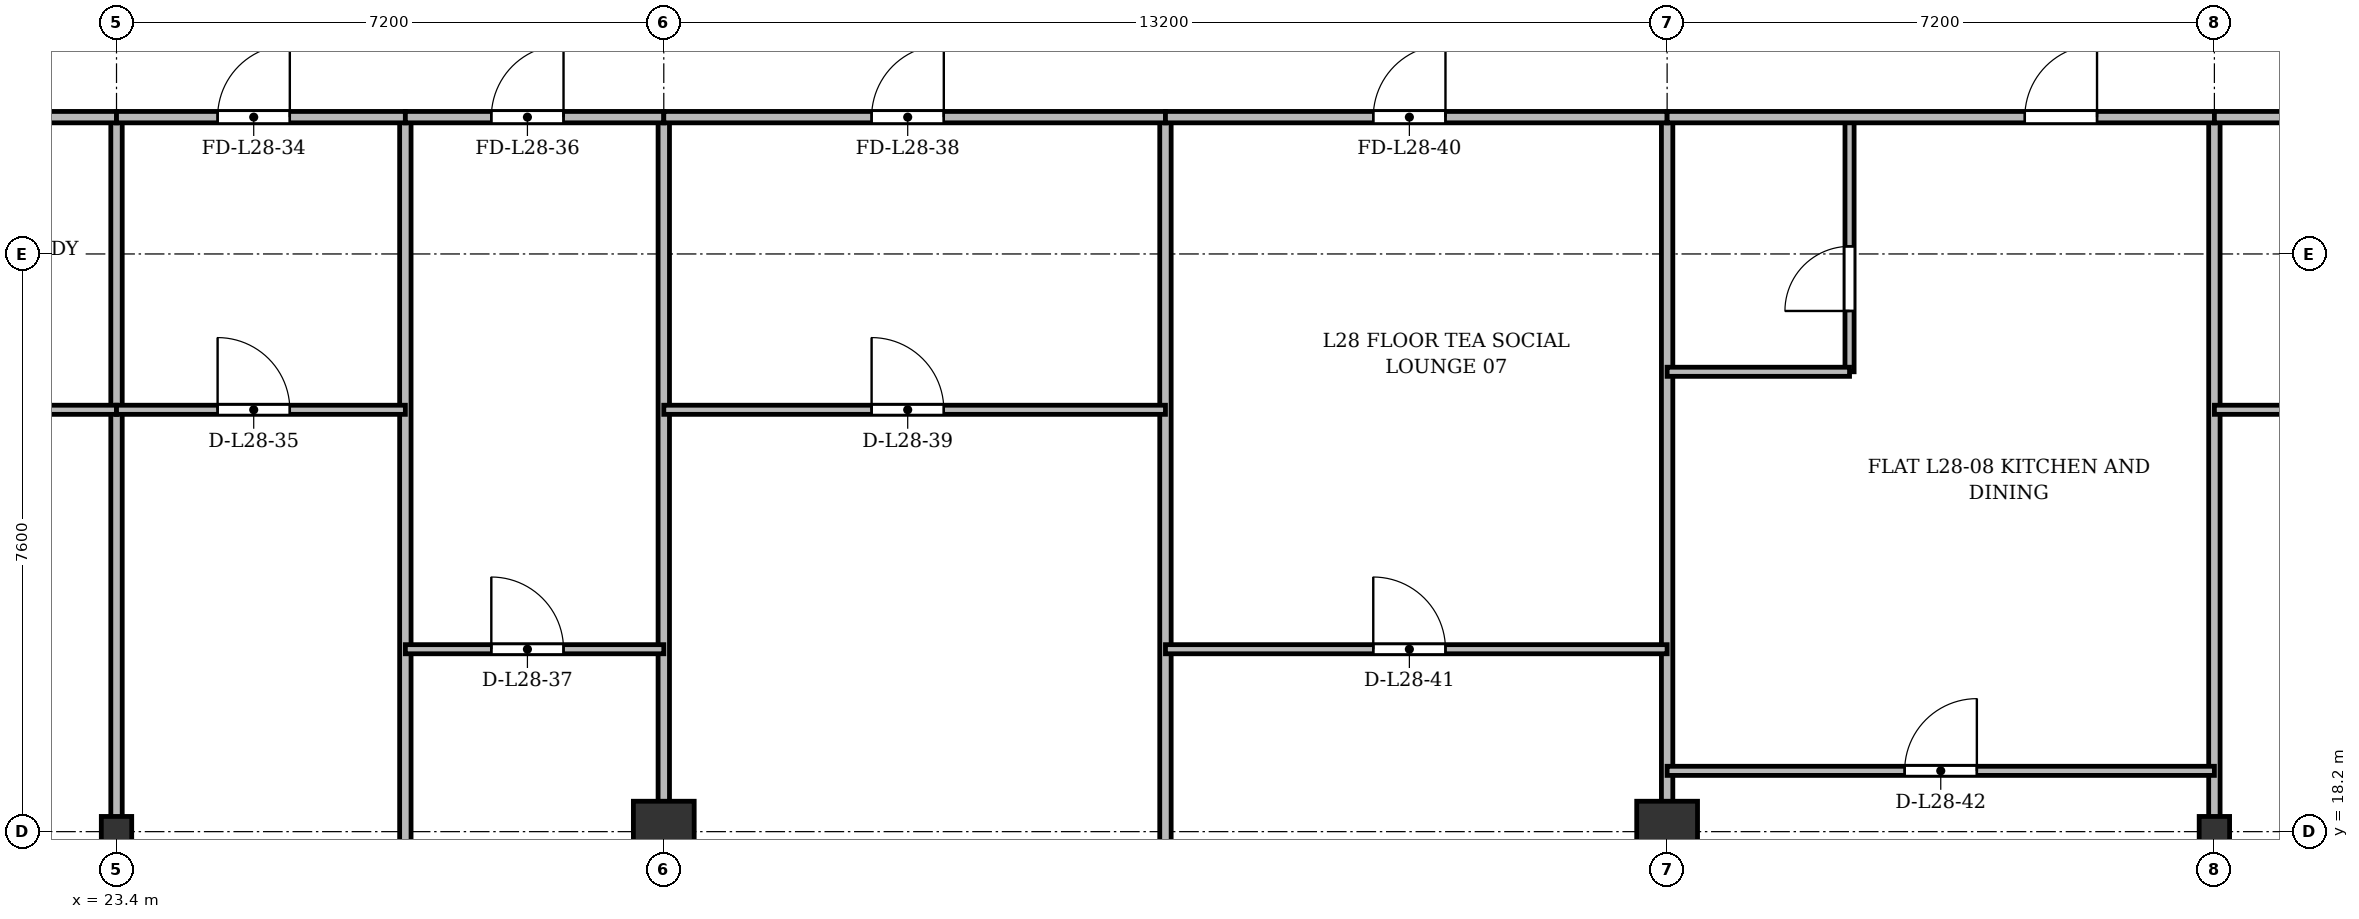
"""IFC4 building model, lengths in metres.
Left out: names, types, materials, properties, quantities, classifications, styles, units other than length and angle.
Written with IfcOpenShell. Run it as: python <this file> out.ifc"""

import sys

from ifc_helpers import new_model, si_unit, direction, frame, frame_2d, origin, origin_2d, place, context, subcontext, project, spatial, rectangle, i_section, extrude, source, transform, mapped, element, fill, save


model = new_model("IFC4")
c1 = context("Model", 3, precision=1e-05, world=origin(), true_north=direction((0.0, 1.0)))
c2 = subcontext(c1, "Body", "Model", "MODEL_VIEW")
j1 = project(units=[si_unit("LENGTHUNIT", "METRE"), si_unit("PLANEANGLEUNIT", "RADIAN")], contexts=[c1])
p1 = place(None, origin())
s1 = spatial("IfcSite", under=j1, at=p1, CompositionType="ELEMENT")
p2 = place(p1, origin())
s2 = spatial("IfcBuilding", under=s1, at=p2, CompositionType="ELEMENT")
p3 = place(p2, frame((0.0, 0.0, 110.5)))
s3 = spatial("IfcBuildingStorey", under=s2, at=p3, CompositionType="ELEMENT", Elevation=110.5)
m1 = source(origin(), c2, "Body", "SweptSolid", [
    extrude(i_section(OverallWidth=0.4, OverallDepth=0.4, WebThickness=0.022, FlangeThickness=0.035, at=origin_2d()), origin(), (0.0, 0.0, 1.0), 3.6),
])
p4 = place(p3, frame((23.4, 18.2, 0.0), z_axis=(0.0, 0.0, 1.0), x_axis=(1.0, 0.0, 0.0)))
e1 = element("IfcColumn", 1, at=p4, inside=s3, PredefinedType="COLUMN", context=c2, shape_type="MappedRepresentation", body=[
    mapped(m1, transform((0.0, 0.0, 0.0), x_axis=(1.0, 0.0, 0.0), y_axis=(0.0, 1.0, 0.0), z_axis=(0.0, 0.0, 1.0), scale=1.0)),
])
m2 = source(origin(), c2, "Body", "SweptSolid", [
    extrude(rectangle(XDim=0.8, YDim=0.8, at=origin_2d()), origin(), (0.0, 0.0, 1.0), 3.6),
])
for number, where, z_axis, x_axis in (
    (2, (30.6, 18.2, 0.0), (0.0, 0.0, 1.0), (1.0, 0.0, 0.0)),
    (3, (43.8, 18.2, 0.0), (0.0, 0.0, 1.0), (1.0, 0.0, 0.0)),
):
    element("IfcColumn", number, at=place(p3, frame(where, z_axis=z_axis, x_axis=x_axis)), inside=s3, PredefinedType="COLUMN", context=c2, shape_type="MappedRepresentation", body=[
        mapped(m2, transform((0.0, 0.0, 0.0), x_axis=(1.0, 0.0, 0.0), y_axis=(0.0, 1.0, 0.0), z_axis=(0.0, 0.0, 1.0), scale=1.0)),
    ])
p5 = place(p3, frame((51.0, 18.2, 0.0), z_axis=(0.0, 0.0, 1.0), x_axis=(1.0, 0.0, 0.0)))
e4 = element("IfcColumn", 4, at=p5, inside=s3, PredefinedType="COLUMN", context=c2, shape_type="MappedRepresentation", body=[
    mapped(m1, transform((0.0, 0.0, 0.0), x_axis=(1.0, 0.0, 0.0), y_axis=(0.0, 1.0, 0.0), z_axis=(0.0, 0.0, 1.0), scale=1.0)),
])
p6 = place(p3, frame((23.4, 3.145, 0.0), z_axis=(0.0, 0.0, 1.0), x_axis=(0.0, 1.0, 0.0)))
e5 = element("IfcWall", 5, at=p6, inside=s3, PredefinedType="PARTITIONING", context=c2, shape_type="SweptSolid", body=[
    extrude(rectangle(XDim=24.455, YDim=0.15, at=frame_2d((12.228, 0.0))), origin(), (0.0, 0.0, 1.0), 2.84),
])
p7 = place(p3, frame((27.2, 3.145, 0.0), z_axis=(0.0, 0.0, 1.0), x_axis=(0.0, 1.0, 0.0)))
e6 = element("IfcWall", 6, at=p7, inside=s3, PredefinedType="PARTITIONING", context=c2, shape_type="SweptSolid", body=[
    extrude(rectangle(XDim=24.455, YDim=0.15, at=frame_2d((12.228, 0.0))), origin(), (0.0, 0.0, 1.0), 2.752),
])
p8 = place(p3, frame((30.6, 3.145, 0.0), z_axis=(0.0, 0.0, 1.0), x_axis=(0.0, 1.0, 0.0)))
e7 = element("IfcWall", 7, at=p8, inside=s3, PredefinedType="PARTITIONING", context=c2, shape_type="SweptSolid", body=[
    extrude(rectangle(XDim=24.455, YDim=0.15, at=frame_2d((12.228, 0.0))), origin(), (0.0, 0.0, 1.0), 2.84),
])
p9 = place(p3, frame((37.2, 3.145, 0.0), z_axis=(0.0, 0.0, 1.0), x_axis=(0.0, 1.0, 0.0)))
e8 = element("IfcWall", 8, at=p9, inside=s3, PredefinedType="PARTITIONING", context=c2, shape_type="SweptSolid", body=[
    extrude(rectangle(XDim=24.455, YDim=0.15, at=frame_2d((12.228, 0.0))), origin(), (0.0, 0.0, 1.0), 2.752),
])
for number, where, z_axis, x_axis in (
    (9, (43.8, 3.145, 0.0), (0.0, 0.0, 1.0), (0.0, 1.0, 0.0)),
    (10, (51.0, 3.145, 0.0), (0.0, 0.0, 1.0), (0.0, 1.0, 0.0)),
):
    element("IfcWall", number, at=place(p3, frame(where, z_axis=z_axis, x_axis=x_axis)), inside=s3, PredefinedType="PARTITIONING", context=c2, shape_type="SweptSolid", body=[
        extrude(rectangle(XDim=24.455, YDim=0.15, at=frame_2d((12.228, 0.0))), origin(), (0.0, 0.0, 1.0), 2.84),
    ])
p10 = place(p3, frame((15.6, 27.6, 0.0), z_axis=(0.0, 0.0, 1.0), x_axis=(1.0, 0.0, 0.0)))
e11 = element("IfcWall", 11, at=p10, inside=s3, PredefinedType="PARTITIONING", context=c2, shape_type="SweptSolid", body=[
    extrude(rectangle(XDim=7.8, YDim=0.15, at=frame_2d((3.9, 0.0))), origin(), (0.0, 0.0, 1.0), 2.84),
])
p11 = place(p10, frame((3.333, 0.0, 0.0)))
e12 = element("IfcOpeningElement", 12, at=p11, cuts=e11, PredefinedType="OPENING", context=c2, shape_type="SweptSolid", body=[
    extrude(rectangle(XDim=0.95, YDim=2.15, at=frame_2d((0.475, 1.075))), frame((0.0, 0.085, 0.0), z_axis=(0.0, -1.0, 0.0), x_axis=(1.0, 0.0, 0.0)), (0.0, 0.0, 1.0), 0.17),
])
p12 = place(p3, frame((15.6, 23.75, 0.0), z_axis=(0.0, 0.0, 1.0), x_axis=(1.0, 0.0, 0.0)))
e13 = element("IfcWall", 13, at=p12, inside=s3, PredefinedType="PARTITIONING", context=c2, shape_type="SweptSolid", body=[
    extrude(rectangle(XDim=7.8, YDim=0.12, at=frame_2d((3.9, 0.0))), origin(), (0.0, 0.0, 1.0), 2.84),
])
p13 = place(p12, frame((3.333, 0.0, 0.0)))
e14 = element("IfcOpeningElement", 14, at=p13, cuts=e13, PredefinedType="OPENING", context=c2, shape_type="SweptSolid", body=[
    extrude(rectangle(XDim=0.95, YDim=2.15, at=frame_2d((0.475, 1.075))), frame((0.0, 0.07, 0.0), z_axis=(0.0, -1.0, 0.0), x_axis=(1.0, 0.0, 0.0)), (0.0, 0.0, 1.0), 0.14),
])
p14 = place(p3, frame((23.4, 27.6, 0.0), z_axis=(0.0, 0.0, 1.0), x_axis=(1.0, 0.0, 0.0)))
e15 = element("IfcWall", 15, at=p14, inside=s3, PredefinedType="PARTITIONING", context=c2, shape_type="SweptSolid", body=[
    extrude(rectangle(XDim=3.8, YDim=0.15, at=frame_2d((1.9, 0.0))), origin(), (0.0, 0.0, 1.0), 2.84),
])
p15 = place(p14, frame((1.33, 0.0, 0.0)))
e16 = element("IfcOpeningElement", 16, at=p15, cuts=e15, PredefinedType="OPENING", context=c2, shape_type="SweptSolid", body=[
    extrude(rectangle(XDim=0.95, YDim=2.15, at=frame_2d((0.475, 1.075))), frame((0.0, 0.085, 0.0), z_axis=(0.0, -1.0, 0.0), x_axis=(1.0, 0.0, 0.0)), (0.0, 0.0, 1.0), 0.17),
])
p16 = place(p3, frame((23.4, 23.75, 0.0), z_axis=(0.0, 0.0, 1.0), x_axis=(1.0, 0.0, 0.0)))
e17 = element("IfcWall", 17, at=p16, inside=s3, PredefinedType="PARTITIONING", context=c2, shape_type="SweptSolid", body=[
    extrude(rectangle(XDim=3.8, YDim=0.12, at=frame_2d((1.9, 0.0))), origin(), (0.0, 0.0, 1.0), 2.84),
])
p17 = place(p16, frame((1.33, 0.0, 0.0)))
e18 = element("IfcOpeningElement", 18, at=p17, cuts=e17, PredefinedType="OPENING", context=c2, shape_type="SweptSolid", body=[
    extrude(rectangle(XDim=0.95, YDim=2.15, at=frame_2d((0.475, 1.075))), frame((0.0, 0.07, 0.0), z_axis=(0.0, -1.0, 0.0), x_axis=(1.0, 0.0, 0.0)), (0.0, 0.0, 1.0), 0.14),
])
p18 = place(p3, frame((27.2, 27.6, 0.0), z_axis=(0.0, 0.0, 1.0), x_axis=(1.0, 0.0, 0.0)))
e19 = element("IfcWall", 19, at=p18, inside=s3, PredefinedType="PARTITIONING", context=c2, shape_type="SweptSolid", body=[
    extrude(rectangle(XDim=3.4, YDim=0.15, at=frame_2d((1.7, 0.0))), origin(), (0.0, 0.0, 1.0), 2.84),
])
p19 = place(p18, frame((1.131, 0.0, 0.0)))
e20 = element("IfcOpeningElement", 20, at=p19, cuts=e19, PredefinedType="OPENING", context=c2, shape_type="SweptSolid", body=[
    extrude(rectangle(XDim=0.95, YDim=2.15, at=frame_2d((0.475, 1.075))), frame((0.0, 0.085, 0.0), z_axis=(0.0, -1.0, 0.0), x_axis=(1.0, 0.0, 0.0)), (0.0, 0.0, 1.0), 0.17),
])
p20 = place(p3, frame((27.2, 20.6, 0.0), z_axis=(0.0, 0.0, 1.0), x_axis=(1.0, 0.0, 0.0)))
e21 = element("IfcWall", 21, at=p20, inside=s3, PredefinedType="PARTITIONING", context=c2, shape_type="SweptSolid", body=[
    extrude(rectangle(XDim=3.4, YDim=0.12, at=frame_2d((1.7, 0.0))), origin(), (0.0, 0.0, 1.0), 2.84),
])
p21 = place(p20, frame((1.131, 0.0, 0.0)))
e22 = element("IfcOpeningElement", 22, at=p21, cuts=e21, PredefinedType="OPENING", context=c2, shape_type="SweptSolid", body=[
    extrude(rectangle(XDim=0.95, YDim=2.15, at=frame_2d((0.475, 1.075))), frame((0.0, 0.07, 0.0), z_axis=(0.0, -1.0, 0.0), x_axis=(1.0, 0.0, 0.0)), (0.0, 0.0, 1.0), 0.14),
])
p22 = place(p3, frame((30.6, 27.6, 0.0), z_axis=(0.0, 0.0, 1.0), x_axis=(1.0, 0.0, 0.0)))
e23 = element("IfcWall", 23, at=p22, inside=s3, PredefinedType="PARTITIONING", context=c2, shape_type="SweptSolid", body=[
    extrude(rectangle(XDim=6.6, YDim=0.15, at=frame_2d((3.3, 0.0))), origin(), (0.0, 0.0, 1.0), 2.84),
])
p23 = place(p22, frame((2.734, 0.0, 0.0)))
e24 = element("IfcOpeningElement", 24, at=p23, cuts=e23, PredefinedType="OPENING", context=c2, shape_type="SweptSolid", body=[
    extrude(rectangle(XDim=0.95, YDim=2.15, at=frame_2d((0.475, 1.075))), frame((0.0, 0.085, 0.0), z_axis=(0.0, -1.0, 0.0), x_axis=(1.0, 0.0, 0.0)), (0.0, 0.0, 1.0), 0.17),
])
p24 = place(p3, frame((30.6, 23.75, 0.0), z_axis=(0.0, 0.0, 1.0), x_axis=(1.0, 0.0, 0.0)))
e25 = element("IfcWall", 25, at=p24, inside=s3, PredefinedType="PARTITIONING", context=c2, shape_type="SweptSolid", body=[
    extrude(rectangle(XDim=6.6, YDim=0.12, at=frame_2d((3.3, 0.0))), origin(), (0.0, 0.0, 1.0), 2.84),
])
p25 = place(p24, frame((2.734, 0.0, 0.0)))
e26 = element("IfcOpeningElement", 26, at=p25, cuts=e25, PredefinedType="OPENING", context=c2, shape_type="SweptSolid", body=[
    extrude(rectangle(XDim=0.95, YDim=2.15, at=frame_2d((0.475, 1.075))), frame((0.0, 0.07, 0.0), z_axis=(0.0, -1.0, 0.0), x_axis=(1.0, 0.0, 0.0)), (0.0, 0.0, 1.0), 0.14),
])
p26 = place(p3, frame((37.2, 27.6, 0.0), z_axis=(0.0, 0.0, 1.0), x_axis=(1.0, 0.0, 0.0)))
e27 = element("IfcWall", 27, at=p26, inside=s3, PredefinedType="PARTITIONING", context=c2, shape_type="SweptSolid", body=[
    extrude(rectangle(XDim=6.6, YDim=0.15, at=frame_2d((3.3, 0.0))), origin(), (0.0, 0.0, 1.0), 2.84),
])
p27 = place(p26, frame((2.734, 0.0, 0.0)))
e28 = element("IfcOpeningElement", 28, at=p27, cuts=e27, PredefinedType="OPENING", context=c2, shape_type="SweptSolid", body=[
    extrude(rectangle(XDim=0.95, YDim=2.15, at=frame_2d((0.475, 1.075))), frame((0.0, 0.085, 0.0), z_axis=(0.0, -1.0, 0.0), x_axis=(1.0, 0.0, 0.0)), (0.0, 0.0, 1.0), 0.17),
])
p28 = place(p3, frame((37.2, 20.6, 0.0), z_axis=(0.0, 0.0, 1.0), x_axis=(1.0, 0.0, 0.0)))
e29 = element("IfcWall", 29, at=p28, inside=s3, PredefinedType="PARTITIONING", context=c2, shape_type="SweptSolid", body=[
    extrude(rectangle(XDim=6.6, YDim=0.12, at=frame_2d((3.3, 0.0))), origin(), (0.0, 0.0, 1.0), 2.84),
])
p29 = place(p28, frame((2.734, 0.0, 0.0)))
e30 = element("IfcOpeningElement", 30, at=p29, cuts=e29, PredefinedType="OPENING", context=c2, shape_type="SweptSolid", body=[
    extrude(rectangle(XDim=0.95, YDim=2.15, at=frame_2d((0.475, 1.075))), frame((0.0, 0.07, 0.0), z_axis=(0.0, -1.0, 0.0), x_axis=(1.0, 0.0, 0.0)), (0.0, 0.0, 1.0), 0.14),
])
p30 = place(p3, frame((43.8, 19.0, 0.0), z_axis=(0.0, 0.0, 1.0), x_axis=(1.0, 0.0, 0.0)))
e31 = element("IfcWall", 31, at=p30, inside=s3, PredefinedType="PARTITIONING", context=c2, shape_type="SweptSolid", body=[
    extrude(rectangle(XDim=7.2, YDim=0.12, at=frame_2d((3.6, 0.0))), origin(), (0.0, 0.0, 1.0), 2.84),
])
p31 = place(p30, frame((3.125, 0.0, 0.0)))
e32 = element("IfcOpeningElement", 32, at=p31, cuts=e31, PredefinedType="OPENING", context=c2, shape_type="SweptSolid", body=[
    extrude(rectangle(XDim=0.95, YDim=2.15, at=frame_2d((0.475, 1.075))), frame((0.0, 0.07, 0.0), z_axis=(0.0, -1.0, 0.0), x_axis=(1.0, 0.0, 0.0)), (0.0, 0.0, 1.0), 0.14),
])
p32 = place(p3, frame((46.2, 24.25, 0.0), z_axis=(0.0, 0.0, 1.0), x_axis=(0.0, 1.0, 0.0)))
e33 = element("IfcWall", 33, at=p32, inside=s3, PredefinedType="PARTITIONING", context=c2, shape_type="SweptSolid", body=[
    extrude(rectangle(XDim=3.35, YDim=0.12, at=frame_2d((1.675, 0.0))), origin(), (0.0, 0.0, 1.0), 2.99),
])
p33 = place(p32, frame((0.8, 0.0, 0.0)))
e34 = element("IfcOpeningElement", 34, at=p33, cuts=e33, PredefinedType="OPENING", context=c2, shape_type="SweptSolid", body=[
    extrude(rectangle(XDim=0.85, YDim=2.1, at=frame_2d((0.425, 1.05))), frame((0.0, 0.07, 0.0), z_axis=(0.0, -1.0, 0.0), x_axis=(1.0, 0.0, 0.0)), (0.0, 0.0, 1.0), 0.14),
])
p34 = place(p3, frame((43.8, 24.25, 0.0), z_axis=(0.0, 0.0, 1.0), x_axis=(1.0, 0.0, 0.0)))
e35 = element("IfcWall", 35, at=p34, inside=s3, PredefinedType="PARTITIONING", context=c2, shape_type="SweptSolid", body=[
    extrude(rectangle(XDim=2.4, YDim=0.12, at=frame_2d((1.2, 0.0))), origin(), (0.0, 0.0, 1.0), 2.84),
])
p35 = place(p3, frame((43.8, 27.6, 0.0), z_axis=(0.0, 0.0, 1.0), x_axis=(1.0, 0.0, 0.0)))
e36 = element("IfcWall", 36, at=p35, inside=s3, PredefinedType="PARTITIONING", context=c2, shape_type="SweptSolid", body=[
    extrude(rectangle(XDim=7.2, YDim=0.15, at=frame_2d((3.6, 0.0))), origin(), (0.0, 0.0, 1.0), 2.84),
])
p36 = place(p35, frame((4.706, 0.0, 0.0)))
e37 = element("IfcOpeningElement", 37, at=p36, cuts=e36, PredefinedType="OPENING", context=c2, shape_type="SweptSolid", body=[
    extrude(rectangle(XDim=0.95, YDim=2.15, at=frame_2d((0.475, 1.075))), frame((0.0, 0.085, 0.0), z_axis=(0.0, -1.0, 0.0), x_axis=(1.0, 0.0, 0.0)), (0.0, 0.0, 1.0), 0.17),
])
p37 = place(p3, frame((51.0, 27.6, 0.0), z_axis=(0.0, 0.0, 1.0), x_axis=(1.0, 0.0, 0.0)))
e38 = element("IfcWall", 38, at=p37, inside=s3, PredefinedType="PARTITIONING", context=c2, shape_type="SweptSolid", body=[
    extrude(rectangle(XDim=4.0, YDim=0.15, at=frame_2d((2.0, 0.0))), origin(), (0.0, 0.0, 1.0), 2.84),
])
p38 = place(p37, frame((1.525, 0.0, 0.0)))
e39 = element("IfcOpeningElement", 39, at=p38, cuts=e38, PredefinedType="OPENING", context=c2, shape_type="SweptSolid", body=[
    extrude(rectangle(XDim=0.95, YDim=2.15, at=frame_2d((0.475, 1.075))), frame((0.0, 0.085, 0.0), z_axis=(0.0, -1.0, 0.0), x_axis=(1.0, 0.0, 0.0)), (0.0, 0.0, 1.0), 0.17),
])
p39 = place(p3, frame((51.0, 23.75, 0.0), z_axis=(0.0, 0.0, 1.0), x_axis=(1.0, 0.0, 0.0)))
e40 = element("IfcWall", 40, at=p39, inside=s3, PredefinedType="PARTITIONING", context=c2, shape_type="SweptSolid", body=[
    extrude(rectangle(XDim=4.0, YDim=0.12, at=frame_2d((2.0, 0.0))), origin(), (0.0, 0.0, 1.0), 2.84),
])
p40 = place(p39, frame((1.525, 0.0, 0.0)))
e41 = element("IfcOpeningElement", 41, at=p40, cuts=e40, PredefinedType="OPENING", context=c2, shape_type="SweptSolid", body=[
    extrude(rectangle(XDim=0.95, YDim=2.15, at=frame_2d((0.475, 1.075))), frame((0.0, 0.07, 0.0), z_axis=(0.0, -1.0, 0.0), x_axis=(1.0, 0.0, 0.0)), (0.0, 0.0, 1.0), 0.14),
])
m3 = source(origin(), c2, "Body", "SweptSolid", [
    extrude(rectangle(XDim=0.95, YDim=2.15, at=frame_2d((0.475, 1.075))), frame((0.0, 0.025, 0.0), z_axis=(0.0, -1.0, 0.0), x_axis=(1.0, 0.0, 0.0)), (0.0, 0.0, 1.0), 0.05),
])
p41 = place(p15, origin())
e42 = element("IfcDoor", 42, at=p41, inside=s3, OperationType="SINGLE_SWING_RIGHT", PredefinedType="DOOR", context=c2, shape_type="MappedRepresentation", body=[
    mapped(m3, transform((0.0, 0.0, 0.0), x_axis=(1.0, 0.0, 0.0), y_axis=(0.0, 1.0, 0.0), z_axis=(0.0, 0.0, 1.0), scale=1.0)),
])
fill(e16, e42)
p42 = place(p17, origin())
e43 = element("IfcDoor", 43, at=p42, inside=s3, OperationType="SINGLE_SWING_LEFT", PredefinedType="DOOR", context=c2, shape_type="MappedRepresentation", body=[
    mapped(m3, transform((0.0, 0.0, 0.0), x_axis=(1.0, 0.0, 0.0), y_axis=(0.0, 1.0, 0.0), z_axis=(0.0, 0.0, 1.0), scale=1.0)),
])
fill(e18, e43)
p43 = place(p19, origin())
e44 = element("IfcDoor", 44, at=p43, inside=s3, OperationType="SINGLE_SWING_RIGHT", PredefinedType="DOOR", context=c2, shape_type="MappedRepresentation", body=[
    mapped(m3, transform((0.0, 0.0, 0.0), x_axis=(1.0, 0.0, 0.0), y_axis=(0.0, 1.0, 0.0), z_axis=(0.0, 0.0, 1.0), scale=1.0)),
])
fill(e20, e44)
p44 = place(p21, origin())
e45 = element("IfcDoor", 45, at=p44, inside=s3, OperationType="SINGLE_SWING_LEFT", PredefinedType="DOOR", context=c2, shape_type="MappedRepresentation", body=[
    mapped(m3, transform((0.0, 0.0, 0.0), x_axis=(1.0, 0.0, 0.0), y_axis=(0.0, 1.0, 0.0), z_axis=(0.0, 0.0, 1.0), scale=1.0)),
])
fill(e22, e45)
p45 = place(p23, origin())
e46 = element("IfcDoor", 46, at=p45, inside=s3, OperationType="SINGLE_SWING_RIGHT", PredefinedType="DOOR", context=c2, shape_type="MappedRepresentation", body=[
    mapped(m3, transform((0.0, 0.0, 0.0), x_axis=(1.0, 0.0, 0.0), y_axis=(0.0, 1.0, 0.0), z_axis=(0.0, 0.0, 1.0), scale=1.0)),
])
fill(e24, e46)
p46 = place(p25, origin())
e47 = element("IfcDoor", 47, at=p46, inside=s3, OperationType="SINGLE_SWING_LEFT", PredefinedType="DOOR", context=c2, shape_type="MappedRepresentation", body=[
    mapped(m3, transform((0.0, 0.0, 0.0), x_axis=(1.0, 0.0, 0.0), y_axis=(0.0, 1.0, 0.0), z_axis=(0.0, 0.0, 1.0), scale=1.0)),
])
fill(e26, e47)
p47 = place(p27, origin())
e48 = element("IfcDoor", 48, at=p47, inside=s3, OperationType="SINGLE_SWING_RIGHT", PredefinedType="DOOR", context=c2, shape_type="MappedRepresentation", body=[
    mapped(m3, transform((0.0, 0.0, 0.0), x_axis=(1.0, 0.0, 0.0), y_axis=(0.0, 1.0, 0.0), z_axis=(0.0, 0.0, 1.0), scale=1.0)),
])
fill(e28, e48)
p48 = place(p29, origin())
e49 = element("IfcDoor", 49, at=p48, inside=s3, OperationType="SINGLE_SWING_LEFT", PredefinedType="DOOR", context=c2, shape_type="MappedRepresentation", body=[
    mapped(m3, transform((0.0, 0.0, 0.0), x_axis=(1.0, 0.0, 0.0), y_axis=(0.0, 1.0, 0.0), z_axis=(0.0, 0.0, 1.0), scale=1.0)),
])
fill(e30, e49)
p49 = place(p31, origin())
e50 = element("IfcDoor", 50, at=p49, inside=s3, OperationType="SINGLE_SWING_RIGHT", PredefinedType="DOOR", context=c2, shape_type="MappedRepresentation", body=[
    mapped(m3, transform((0.0, 0.0, 0.0), x_axis=(1.0, 0.0, 0.0), y_axis=(0.0, 1.0, 0.0), z_axis=(0.0, 0.0, 1.0), scale=1.0)),
])
fill(e32, e50)
m4 = source(origin(), c2, "Body", "SweptSolid", [
    extrude(rectangle(XDim=0.85, YDim=2.1, at=frame_2d((0.425, 1.05))), frame((0.0, 0.025, 0.0), z_axis=(0.0, -1.0, 0.0), x_axis=(1.0, 0.0, 0.0)), (0.0, 0.0, 1.0), 0.05),
])
p50 = place(p33, origin())
e51 = element("IfcDoor", 51, at=p50, inside=s3, OperationType="SINGLE_SWING_LEFT", PredefinedType="DOOR", context=c2, shape_type="MappedRepresentation", body=[
    mapped(m4, transform((0.0, 0.0, 0.0), x_axis=(1.0, 0.0, 0.0), y_axis=(0.0, 1.0, 0.0), z_axis=(0.0, 0.0, 1.0), scale=1.0)),
])
fill(e34, e51)
p51 = place(p36, origin())
e52 = element("IfcDoor", 52, at=p51, inside=s3, OperationType="SINGLE_SWING_RIGHT", PredefinedType="DOOR", context=c2, shape_type="MappedRepresentation", body=[
    mapped(m3, transform((0.0, 0.0, 0.0), x_axis=(1.0, 0.0, 0.0), y_axis=(0.0, 1.0, 0.0), z_axis=(0.0, 0.0, 1.0), scale=1.0)),
])
fill(e37, e52)
save(model, sys.argv[1])
